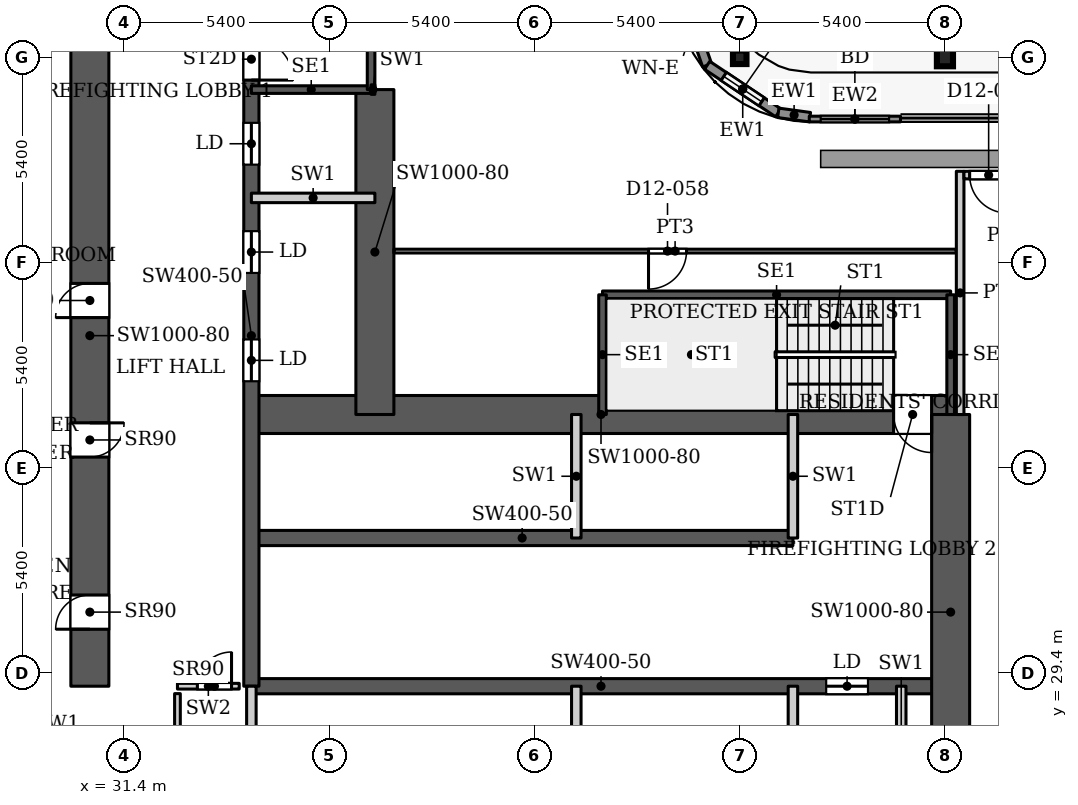
"""IFC4 building model, lengths in metres.
Left out: names, types, materials, properties, quantities, classifications, styles, units other than length and angle.
Written with IfcOpenShell. Run it as: python <this file> out.ifc"""

import sys

from ifc_helpers import new_model, si_unit, direction, frame, frame_2d, origin, origin_2d, place, context, subcontext, project, spatial, rectangle, hollow_rectangle, i_section, extrude, source, transform, mapped, element, fill, save


model = new_model("IFC4")
c1 = context("Model", 3, precision=1e-05, world=origin(), true_north=direction((0.0, 1.0)))
c2 = subcontext(c1, "Body", "Model", "MODEL_VIEW")
j1 = project(units=[si_unit("LENGTHUNIT", "METRE"), si_unit("PLANEANGLEUNIT", "RADIAN")], contexts=[c1])
p1 = place(None, origin())
s1 = spatial("IfcSite", under=j1, at=p1, CompositionType="ELEMENT")
p2 = place(p1, origin())
s2 = spatial("IfcBuilding", under=s1, at=p2, CompositionType="ELEMENT")
p3 = place(p2, frame((0.0, 0.0, 53.9)))
s3 = spatial("IfcBuildingStorey", under=s2, at=p3, CompositionType="ELEMENT", Elevation=53.9)
p4 = place(p3, frame((53.0, 45.6, 0.0), z_axis=(0.0, 0.0, 1.0), x_axis=(1.0, 0.0, 0.0)))
e1 = element("IfcColumn", 1, at=p4, inside=s3, PredefinedType="COLUMN", context=c2, shape_type="SweptSolid", body=[
    extrude(i_section(OverallWidth=0.424, OverallDepth=0.474, WebThickness=0.048, FlangeThickness=0.077, FilletRadius=0.014, at=origin_2d()), origin(), (0.0, 0.0, 1.0), 3.9),
])
p5 = place(p3, frame((47.6, 45.6, 0.0), z_axis=(0.0, 0.0, 1.0), x_axis=(1.0, 0.0, 0.0)))
e2 = element("IfcColumn", 2, at=p5, inside=s3, PredefinedType="COLUMN", context=c2, shape_type="SweptSolid", body=[
    extrude(hollow_rectangle(XDim=0.356, YDim=0.356, WallThickness=0.016, InnerFilletRadius=0.016, OuterFilletRadius=0.032, at=origin_2d()), origin(), (0.0, 0.0, 1.0), 3.9),
])
p6 = place(p3, frame((34.75, 29.05, 0.0), z_axis=(0.0, 0.0, 1.0), x_axis=(1.0, 0.0, 0.0)))
e3 = element("IfcWall", 3, at=p6, inside=s3, PredefinedType="SHEAR", context=c2, shape_type="SweptSolid", body=[
    extrude(rectangle(XDim=18.4, YDim=0.4, at=frame_2d((9.2, 0.0))), origin(), (0.0, 0.0, 1.0), 3.9),
])
p7 = place(p6, frame((15.125, 0.0, 0.0)))
e4 = element("IfcOpeningElement", 4, at=p7, cuts=e3, PredefinedType="OPENING", context=c2, shape_type="SweptSolid", body=[
    extrude(rectangle(XDim=1.1, YDim=2.2, at=frame_2d((0.55, 1.1))), frame((0.0, 0.21, 0.0), z_axis=(0.0, -1.0, 0.0), x_axis=(1.0, 0.0, 0.0)), (0.0, 0.0, 1.0), 0.42),
])
p8 = place(p3, frame((34.75, 32.95, 0.0), z_axis=(0.0, 0.0, 1.0), x_axis=(1.0, 0.0, 0.0)))
e5 = element("IfcWall", 5, at=p8, inside=s3, PredefinedType="SHEAR", context=c2, shape_type="SweptSolid", body=[
    extrude(rectangle(XDim=14.25, YDim=0.4, at=frame_2d((7.125, 0.0))), origin(), (0.0, 0.0, 1.0), 3.9),
])
p9 = place(p3, frame((34.75, 36.2, 0.0), z_axis=(0.0, 0.0, 1.0), x_axis=(1.0, 0.0, 0.0)))
e6 = element("IfcWall", 6, at=p9, inside=s3, PredefinedType="SHEAR", context=c2, shape_type="SweptSolid", body=[
    extrude(rectangle(XDim=18.4, YDim=1.0, at=frame_2d((9.2, 0.0))), origin(), (0.0, 0.0, 1.0), 3.9),
])
p10 = place(p9, frame((16.9, 0.0, 0.0)))
e7 = element("IfcOpeningElement", 7, at=p10, cuts=e6, PredefinedType="OPENING", context=c2, shape_type="SweptSolid", body=[
    extrude(rectangle(XDim=1.0, YDim=2.2, at=frame_2d((0.5, 1.1))), frame((0.0, 0.51, 0.0), z_axis=(0.0, -1.0, 0.0), x_axis=(1.0, 0.0, 0.0)), (0.0, 0.0, 1.0), 1.02),
])
p11 = place(p3, frame((34.75, 29.05, 0.0), z_axis=(0.0, 0.0, 1.0), x_axis=(0.0, 1.0, 0.0)))
e8 = element("IfcWall", 8, at=p11, inside=s3, PredefinedType="SHEAR", context=c2, shape_type="SweptSolid", body=[
    extrude(rectangle(XDim=18.45, YDim=0.4, at=frame_2d((9.225, 0.0))), origin(), (0.0, 0.0, 1.0), 3.9),
])
p12 = place(p11, frame((8.025, 0.0, 0.0)))
e9 = element("IfcOpeningElement", 9, at=p12, cuts=e8, PredefinedType="OPENING", context=c2, shape_type="SweptSolid", body=[
    extrude(rectangle(XDim=1.1, YDim=2.2, at=frame_2d((0.55, 1.1))), frame((0.0, 0.21, 0.0), z_axis=(0.0, -1.0, 0.0), x_axis=(1.0, 0.0, 0.0)), (0.0, 0.0, 1.0), 0.42),
])
p13 = place(p11, frame((10.875, 0.0, 0.0)))
e10 = element("IfcOpeningElement", 10, at=p13, cuts=e8, PredefinedType="OPENING", context=c2, shape_type="SweptSolid", body=[
    extrude(rectangle(XDim=1.1, YDim=2.2, at=frame_2d((0.55, 1.1))), frame((0.0, 0.21, 0.0), z_axis=(0.0, -1.0, 0.0), x_axis=(1.0, 0.0, 0.0)), (0.0, 0.0, 1.0), 0.42),
])
p14 = place(p11, frame((13.725, 0.0, 0.0)))
e11 = element("IfcOpeningElement", 11, at=p14, cuts=e8, PredefinedType="OPENING", context=c2, shape_type="SweptSolid", body=[
    extrude(rectangle(XDim=1.1, YDim=2.2, at=frame_2d((0.55, 1.1))), frame((0.0, 0.21, 0.0), z_axis=(0.0, -1.0, 0.0), x_axis=(1.0, 0.0, 0.0)), (0.0, 0.0, 1.0), 0.42),
])
p15 = place(p11, frame((15.95, 0.0, 0.0)))
e12 = element("IfcOpeningElement", 12, at=p15, cuts=e8, PredefinedType="OPENING", context=c2, shape_type="SweptSolid", body=[
    extrude(rectangle(XDim=1.1, YDim=2.2, at=frame_2d((0.55, 1.1))), frame((0.0, 0.21, 0.0), z_axis=(0.0, -1.0, 0.0), x_axis=(1.0, 0.0, 0.0)), (0.0, 0.0, 1.0), 0.42),
])
p16 = place(p3, frame((38.0, 36.2, 0.0), z_axis=(0.0, 0.0, 1.0), x_axis=(0.0, 1.0, 0.0)))
e13 = element("IfcWall", 13, at=p16, inside=s3, PredefinedType="SHEAR", context=c2, shape_type="SweptSolid", body=[
    extrude(rectangle(XDim=8.55, YDim=1.0, at=frame_2d((4.275, 0.0))), origin(), (0.0, 0.0, 1.0), 3.9),
])
p17 = place(p3, frame((30.5, 29.05, 0.0), z_axis=(0.0, 0.0, 1.0), x_axis=(0.0, 1.0, 0.0)))
e14 = element("IfcWall", 14, at=p17, inside=s3, PredefinedType="SHEAR", context=c2, shape_type="SweptSolid", body=[
    extrude(rectangle(XDim=18.45, YDim=1.0, at=frame_2d((9.225, 0.0))), origin(), (0.0, 0.0, 1.0), 3.9),
])
p18 = place(p17, frame((1.5, 0.0, 0.0)))
e15 = element("IfcOpeningElement", 15, at=p18, cuts=e14, PredefinedType="OPENING", context=c2, shape_type="SweptSolid", body=[
    extrude(rectangle(XDim=0.9, YDim=2.2, at=frame_2d((0.45, 1.1))), frame((0.0, 0.51, 0.0), z_axis=(0.0, -1.0, 0.0), x_axis=(1.0, 0.0, 0.0)), (0.0, 0.0, 1.0), 1.02),
])
p19 = place(p17, frame((6.03, 0.0, 0.0)))
e16 = element("IfcOpeningElement", 16, at=p19, cuts=e14, PredefinedType="OPENING", context=c2, shape_type="SweptSolid", body=[
    extrude(rectangle(XDim=0.9, YDim=2.2, at=frame_2d((0.45, 1.1))), frame((0.0, 0.51, 0.0), z_axis=(0.0, -1.0, 0.0), x_axis=(1.0, 0.0, 0.0)), (0.0, 0.0, 1.0), 1.02),
])
p20 = place(p17, frame((9.7, 0.0, 0.0)))
e17 = element("IfcOpeningElement", 17, at=p20, cuts=e14, PredefinedType="OPENING", context=c2, shape_type="SweptSolid", body=[
    extrude(rectangle(XDim=0.9, YDim=2.2, at=frame_2d((0.45, 1.1))), frame((0.0, 0.51, 0.0), z_axis=(0.0, -1.0, 0.0), x_axis=(1.0, 0.0, 0.0)), (0.0, 0.0, 1.0), 1.02),
])
p21 = place(p3, frame((53.15, 25.8, 0.0), z_axis=(0.0, 0.0, 1.0), x_axis=(0.0, 1.0, 0.0)))
e18 = element("IfcWall", 18, at=p21, inside=s3, PredefinedType="SHEAR", context=c2, shape_type="SweptSolid", body=[
    extrude(rectangle(XDim=10.4, YDim=1.0, at=frame_2d((5.2, 0.0))), origin(), (0.0, 0.0, 1.0), 3.9),
])
p22 = place(p3, frame((29.712, 26.072, 0.0), z_axis=(0.0, 0.0, 1.0), x_axis=(-0.511028049012, 0.859564036662, 0.0)))
e19 = element("IfcWall", 19, at=p22, inside=s3, PredefinedType="SOLIDWALL", context=c2, shape_type="SweptSolid", body=[
    extrude(rectangle(XDim=4.634, YDim=0.25, at=frame_2d((2.317, 0.0))), origin(), (0.0, 0.0, 1.0), 3.133),
])
p23 = place(p3, frame((27.195, 31.969, 0.0), z_axis=(0.0, 0.0, 1.0), x_axis=(0.052554995867, 0.998618031286, 0.0)))
e20 = element("IfcWall", 20, at=p23, inside=s3, PredefinedType="SOLIDWALL", context=c2, shape_type="SweptSolid", body=[
    extrude(rectangle(XDim=66.787, YDim=0.25, at=frame_2d((33.394, 0.0))), origin(), (0.0, 0.0, 1.0), 3.75),
])
p24 = place(p3, frame((46.018, 47.471, 0.0), z_axis=(0.0, 0.0, 1.0), x_axis=(0.328791208903, -0.944402637093, 0.0)))
e21 = element("IfcWall", 21, at=p24, inside=s3, PredefinedType="SOLIDWALL", context=c2, shape_type="SweptSolid", body=[
    extrude(rectangle(XDim=2.205, YDim=0.25, at=frame_2d((1.102, 0.0))), origin(), (0.0, 0.0, 1.0), 3.75),
])
p25 = place(p24, frame((0.503, 0.0, 0.6)))
e22 = element("IfcOpeningElement", 22, at=p25, cuts=e21, PredefinedType="OPENING", context=c2, shape_type="SweptSolid", body=[
    extrude(rectangle(XDim=1.2, YDim=2.1, at=frame_2d((0.6, 1.05))), frame((0.0, 0.135, 0.0), z_axis=(0.0, -1.0, 0.0), x_axis=(1.0, 0.0, 0.0)), (0.0, 0.0, 1.0), 0.27),
])
p26 = place(p3, frame((46.743, 45.389, 0.0), z_axis=(0.0, 0.0, 1.0), x_axis=(0.831449265529, -0.555600682912, 0.0)))
e23 = element("IfcWall", 23, at=p26, inside=s3, PredefinedType="SOLIDWALL", context=c2, shape_type="SweptSolid", body=[
    extrude(rectangle(XDim=2.251, YDim=0.25, at=frame_2d((1.126, 0.0))), origin(), (0.0, 0.0, 1.0), 3.75),
])
p27 = place(p26, frame((0.525, 0.0, 0.6)))
e24 = element("IfcOpeningElement", 24, at=p27, cuts=e23, PredefinedType="OPENING", context=c2, shape_type="SweptSolid", body=[
    extrude(rectangle(XDim=1.2, YDim=2.1, at=frame_2d((0.6, 1.05))), frame((0.0, 0.135, 0.0), z_axis=(0.0, -1.0, 0.0), x_axis=(1.0, 0.0, 0.0)), (0.0, 0.0, 1.0), 0.27),
])
p28 = place(p3, frame((48.615, 44.138, 0.0), z_axis=(0.0, 0.0, 1.0), x_axis=(0.990741504246, -0.135761819977, 0.0)))
e25 = element("IfcWall", 25, at=p28, inside=s3, PredefinedType="SOLIDWALL", context=c2, shape_type="SweptSolid", body=[
    extrude(rectangle(XDim=0.84, YDim=0.25, at=frame_2d((0.42, 0.0))), origin(), (0.0, 0.0, 1.0), 3.75),
])
p29 = place(p3, frame((49.43, 43.975, 0.0), z_axis=(0.0, 0.0, 1.0), x_axis=(1.0, 0.0, 0.0)))
e26 = element("IfcWall", 26, at=p29, inside=s3, PredefinedType="SOLIDWALL", context=c2, shape_type="SweptSolid", body=[
    extrude(rectangle(XDim=2.4, YDim=0.15, at=frame_2d((1.2, 0.0))), origin(), (0.0, 0.0, 1.0), 3.75),
])
p30 = place(p29, frame((0.3, 0.0, 0.0)))
e27 = element("IfcOpeningElement", 27, at=p30, cuts=e26, PredefinedType="OPENING", context=c2, shape_type="SweptSolid", body=[
    extrude(rectangle(XDim=1.8, YDim=2.4, at=frame_2d((0.9, 1.2))), frame((0.0, 0.085, 0.0), z_axis=(0.0, -1.0, 0.0), x_axis=(1.0, 0.0, 0.0)), (0.0, 0.0, 1.0), 0.17),
])
p31 = place(p3, frame((43.99, 39.35, 0.0), z_axis=(0.0, 0.0, 1.0), x_axis=(1.0, 0.0, 0.0)))
e28 = element("IfcWall", 28, at=p31, inside=s3, PredefinedType="SHEAR", context=c2, shape_type="SweptSolid", body=[
    extrude(rectangle(XDim=9.16, YDim=0.2, at=frame_2d((4.58, 0.0))), origin(), (0.0, 0.0, 1.0), 3.9),
])
for number, where, z_axis, x_axis in (
    (29, (43.99, 36.2, 0.0), (0.0, 0.0, 1.0), (0.0, 1.0, 0.0)),
    (30, (53.15, 36.2, 0.0), (0.0, 0.0, 1.0), (0.0, 1.0, 0.0)),
):
    element("IfcWall", number, at=place(p3, frame(where, z_axis=z_axis, x_axis=x_axis)), inside=s3, PredefinedType="SHEAR", context=c2, shape_type="SweptSolid", body=[
        extrude(rectangle(XDim=3.15, YDim=0.2, at=frame_2d((1.575, 0.0))), origin(), (0.0, 0.0, 1.0), 3.9),
    ])
p32 = place(p3, frame((34.75, 44.75, 0.0), z_axis=(0.0, 0.0, 1.0), x_axis=(1.0, 0.0, 0.0)))
e31 = element("IfcWall", 31, at=p32, inside=s3, PredefinedType="SHEAR", context=c2, shape_type="SweptSolid", body=[
    extrude(rectangle(XDim=3.15, YDim=0.2, at=frame_2d((1.575, 0.0))), origin(), (0.0, 0.0, 1.0), 3.9),
])
p33 = place(p3, frame((37.9, 44.75, 0.0), z_axis=(0.0, 0.0, 1.0), x_axis=(0.0, 1.0, 0.0)))
e32 = element("IfcWall", 32, at=p33, inside=s3, PredefinedType="SHEAR", context=c2, shape_type="SweptSolid", body=[
    extrude(rectangle(XDim=9.16, YDim=0.2, at=frame_2d((4.58, 0.0))), origin(), (0.0, 0.0, 1.0), 3.9),
])
for number, where, z_axis, x_axis in (
    (33, (34.75, 25.8, 0.0), (0.0, 0.0, 1.0), (0.0, 1.0, 0.0)),
    (34, (43.3, 25.8, 0.0), (0.0, 0.0, 1.0), (0.0, 1.0, 0.0)),
    (35, (43.3, 32.95, 0.0), (0.0, 0.0, 1.0), (0.0, 1.0, 0.0)),
    (36, (49.0, 25.8, 0.0), (0.0, 0.0, 1.0), (0.0, 1.0, 0.0)),
    (37, (49.0, 32.95, 0.0), (0.0, 0.0, 1.0), (0.0, 1.0, 0.0)),
    (38, (51.85, 25.8, 0.0), (0.0, 0.0, 1.0), (0.0, 1.0, 0.0)),
    (39, (34.75, 41.9, 0.0), (0.0, 0.0, 1.0), (1.0, 0.0, 0.0)),
):
    element("IfcWall", number, at=place(p3, frame(where, z_axis=z_axis, x_axis=x_axis)), inside=s3, PredefinedType="PARTITIONING", context=c2, shape_type="SweptSolid", body=[
        extrude(rectangle(XDim=3.25, YDim=0.25, at=frame_2d((1.625, 0.0))), origin(), (0.0, 0.0, 1.0), 3.9),
    ])
p34 = place(p3, frame((37.9, 44.75, 0.0), z_axis=(0.0, 0.0, 1.0), x_axis=(1.0, 0.0, 0.0)))
e40 = element("IfcWall", 40, at=p34, inside=s3, PredefinedType="PARTITIONING", context=c2, shape_type="SweptSolid", body=[
    extrude(rectangle(XDim=0.1, YDim=0.25, at=frame_2d((0.05, 0.0))), origin(), (0.0, 0.0, 1.0), 3.9),
])
p35 = place(p3, frame((32.805, 29.05, 0.0), z_axis=(0.0, 0.0, 1.0), x_axis=(1.0, 0.0, 0.0)))
e41 = element("IfcWall", 41, at=p35, inside=s3, PredefinedType="PARTITIONING", context=c2, shape_type="SweptSolid", body=[
    extrude(rectangle(XDim=1.625, YDim=0.15, at=frame_2d((0.812, 0.0))), origin(), (0.0, 0.0, 1.0), 3.9),
])
p36 = place(p35, frame((0.523, 0.0, 0.0)))
e42 = element("IfcOpeningElement", 42, at=p36, cuts=e41, PredefinedType="OPENING", context=c2, shape_type="SweptSolid", body=[
    extrude(rectangle(XDim=0.9, YDim=2.2, at=frame_2d((0.45, 1.1))), frame((0.0, 0.085, 0.0), z_axis=(0.0, -1.0, 0.0), x_axis=(1.0, 0.0, 0.0)), (0.0, 0.0, 1.0), 0.17),
])
p37 = place(p3, frame((32.805, 24.98, 0.0), z_axis=(0.0, 0.0, 1.0), x_axis=(0.0, 1.0, 0.0)))
e43 = element("IfcWall", 43, at=p37, inside=s3, PredefinedType="PARTITIONING", context=c2, shape_type="SweptSolid", body=[
    extrude(rectangle(XDim=3.875, YDim=0.15, at=frame_2d((1.938, 0.0))), origin(), (0.0, 0.0, 1.0), 3.9),
])
p38 = place(p3, frame((38.499, 40.5, 0.0), z_axis=(0.0, 0.0, 1.0), x_axis=(1.0, 0.0, 0.0)))
e44 = element("IfcWall", 44, at=p38, inside=s3, PredefinedType="PARTITIONING", context=c2, shape_type="SweptSolid", body=[
    extrude(rectangle(XDim=14.801, YDim=0.1, at=frame_2d((7.4, 0.0))), origin(), (0.0, 0.0, 1.0), 3.6),
])
p39 = place(p38, frame((6.701, 0.0, 0.0)))
e45 = element("IfcOpeningElement", 45, at=p39, cuts=e44, PredefinedType="OPENING", context=c2, shape_type="SweptSolid", body=[
    extrude(rectangle(XDim=1.0, YDim=2.1, at=frame_2d((0.5, 1.05))), frame((0.0, 0.06, 0.0), z_axis=(0.0, -1.0, 0.0), x_axis=(1.0, 0.0, 0.0)), (0.0, 0.0, 1.0), 0.12),
])
p40 = place(p3, frame((53.4, 36.199, 0.0), z_axis=(0.0, 0.0, 1.0), x_axis=(0.0, 1.0, 0.0)))
e46 = element("IfcWall", 46, at=p40, inside=s3, PredefinedType="PARTITIONING", context=c2, shape_type="SweptSolid", body=[
    extrude(rectangle(XDim=6.401, YDim=0.2, at=frame_2d((3.201, 0.0))), origin(), (0.0, 0.0, 1.0), 3.6),
])
p41 = place(p3, frame((53.5, 42.5, 0.0), z_axis=(0.0, 0.0, 1.0), x_axis=(1.0, 0.0, 0.0)))
e47 = element("IfcWall", 47, at=p41, inside=s3, PredefinedType="PARTITIONING", context=c2, shape_type="SweptSolid", body=[
    extrude(rectangle(XDim=2.2, YDim=0.2, at=frame_2d((1.1, 0.0))), origin(), (0.0, 0.0, 1.0), 3.6),
])
p42 = place(p41, frame((0.15, 0.0, 0.0)))
e48 = element("IfcOpeningElement", 48, at=p42, cuts=e47, PredefinedType="OPENING", context=c2, shape_type="SweptSolid", body=[
    extrude(rectangle(XDim=1.0, YDim=2.1, at=frame_2d((0.5, 1.05))), frame((0.0, 0.11, 0.0), z_axis=(0.0, -1.0, 0.0), x_axis=(1.0, 0.0, 0.0)), (0.0, 0.0, 1.0), 0.22),
])
m1 = source(origin(), c2, "Body", "SweptSolid", [
    extrude(rectangle(XDim=1.2, YDim=2.1, at=frame_2d((0.6, 1.05))), frame((0.0, 0.03, 0.0), z_axis=(0.0, -1.0, 0.0), x_axis=(1.0, 0.0, 0.0)), (0.0, 0.0, 1.0), 0.06),
])
p43 = place(p27, origin())
e49 = element("IfcWindow", 49, at=p43, inside=s3, PartitioningType="SINGLE_PANEL", PredefinedType="WINDOW", context=c2, shape_type="MappedRepresentation", body=[
    mapped(m1, transform((0.0, 0.0, 0.0), x_axis=(1.0, 0.0, 0.0), y_axis=(0.0, 1.0, 0.0), z_axis=(0.0, 0.0, 1.0), scale=1.0)),
])
fill(e24, e49)
m2 = source(origin(), c2, "Body", "SweptSolid", [
    extrude(rectangle(XDim=1.8, YDim=2.4, at=frame_2d((0.9, 1.2))), frame((0.0, 0.025, 0.0), z_axis=(0.0, -1.0, 0.0), x_axis=(1.0, 0.0, 0.0)), (0.0, 0.0, 1.0), 0.05),
])
p44 = place(p30, origin())
e50 = element("IfcDoor", 50, at=p44, inside=s3, OperationType="SLIDING_TO_LEFT", PredefinedType="DOOR", context=c2, shape_type="MappedRepresentation", body=[
    mapped(m2, transform((0.0, 0.0, 0.0), x_axis=(1.0, 0.0, 0.0), y_axis=(0.0, 1.0, 0.0), z_axis=(0.0, 0.0, 1.0), scale=1.0)),
])
fill(e27, e50)
m3 = source(origin(), c2, "Body", "SweptSolid", [
    extrude(rectangle(XDim=1.1, YDim=2.2, at=frame_2d((0.55, 1.1))), frame((0.0, 0.025, 0.0), z_axis=(0.0, -1.0, 0.0), x_axis=(1.0, 0.0, 0.0)), (0.0, 0.0, 1.0), 0.05),
])
p45 = place(p12, origin())
e51 = element("IfcDoor", 51, at=p45, inside=s3, OperationType="SLIDING_TO_LEFT", PredefinedType="DOOR", context=c2, shape_type="MappedRepresentation", body=[
    mapped(m3, transform((0.0, 0.0, 0.0), x_axis=(1.0, 0.0, 0.0), y_axis=(0.0, 1.0, 0.0), z_axis=(0.0, 0.0, 1.0), scale=1.0)),
])
fill(e9, e51)
p46 = place(p13, origin())
e52 = element("IfcDoor", 52, at=p46, inside=s3, OperationType="SLIDING_TO_LEFT", PredefinedType="DOOR", context=c2, shape_type="MappedRepresentation", body=[
    mapped(m3, transform((0.0, 0.0, 0.0), x_axis=(1.0, 0.0, 0.0), y_axis=(0.0, 1.0, 0.0), z_axis=(0.0, 0.0, 1.0), scale=1.0)),
])
fill(e10, e52)
p47 = place(p14, origin())
e53 = element("IfcDoor", 53, at=p47, inside=s3, OperationType="SLIDING_TO_LEFT", PredefinedType="DOOR", context=c2, shape_type="MappedRepresentation", body=[
    mapped(m3, transform((0.0, 0.0, 0.0), x_axis=(1.0, 0.0, 0.0), y_axis=(0.0, 1.0, 0.0), z_axis=(0.0, 0.0, 1.0), scale=1.0)),
])
fill(e11, e53)
p48 = place(p7, origin())
e54 = element("IfcDoor", 54, at=p48, inside=s3, OperationType="SLIDING_TO_LEFT", PredefinedType="DOOR", context=c2, shape_type="MappedRepresentation", body=[
    mapped(m3, transform((0.0, 0.0, 0.0), x_axis=(1.0, 0.0, 0.0), y_axis=(0.0, 1.0, 0.0), z_axis=(0.0, 0.0, 1.0), scale=1.0)),
])
fill(e4, e54)
m4 = source(origin(), c2, "Body", "SweptSolid", [
    extrude(rectangle(XDim=0.9, YDim=2.2, at=frame_2d((0.45, 1.1))), frame((0.0, 0.025, 0.0), z_axis=(0.0, -1.0, 0.0), x_axis=(1.0, 0.0, 0.0)), (0.0, 0.0, 1.0), 0.05),
])
p49 = place(p18, origin())
e55 = element("IfcDoor", 55, at=p49, inside=s3, OperationType="SINGLE_SWING_LEFT", PredefinedType="DOOR", context=c2, shape_type="MappedRepresentation", body=[
    mapped(m4, transform((0.0, 0.0, 0.0), x_axis=(1.0, 0.0, 0.0), y_axis=(0.0, 1.0, 0.0), z_axis=(0.0, 0.0, 1.0), scale=1.0)),
])
fill(e15, e55)
p50 = place(p19, origin())
e56 = element("IfcDoor", 56, at=p50, inside=s3, OperationType="SINGLE_SWING_RIGHT", PredefinedType="DOOR", context=c2, shape_type="MappedRepresentation", body=[
    mapped(m4, transform((0.0, 0.0, 0.0), x_axis=(1.0, 0.0, 0.0), y_axis=(0.0, 1.0, 0.0), z_axis=(0.0, 0.0, 1.0), scale=1.0)),
])
fill(e16, e56)
p51 = place(p20, origin())
e57 = element("IfcDoor", 57, at=p51, inside=s3, OperationType="SINGLE_SWING_LEFT", PredefinedType="DOOR", context=c2, shape_type="MappedRepresentation", body=[
    mapped(m4, transform((0.0, 0.0, 0.0), x_axis=(1.0, 0.0, 0.0), y_axis=(0.0, 1.0, 0.0), z_axis=(0.0, 0.0, 1.0), scale=1.0)),
])
fill(e17, e57)
p52 = place(p36, origin())
e58 = element("IfcDoor", 58, at=p52, inside=s3, OperationType="SINGLE_SWING_LEFT", PredefinedType="DOOR", context=c2, shape_type="MappedRepresentation", body=[
    mapped(m4, transform((0.0, 0.0, 0.0), x_axis=(1.0, 0.0, 0.0), y_axis=(0.0, 1.0, 0.0), z_axis=(0.0, 0.0, 1.0), scale=1.0)),
])
fill(e42, e58)
m5 = source(origin(), c2, "Body", "SweptSolid", [
    extrude(rectangle(XDim=1.0, YDim=2.2, at=frame_2d((0.5, 1.1))), frame((0.0, 0.025, 0.0), z_axis=(0.0, -1.0, 0.0), x_axis=(1.0, 0.0, 0.0)), (0.0, 0.0, 1.0), 0.05),
])
p53 = place(p10, origin())
e59 = element("IfcDoor", 59, at=p53, inside=s3, OperationType="SINGLE_SWING_RIGHT", PredefinedType="DOOR", context=c2, shape_type="MappedRepresentation", body=[
    mapped(m5, transform((0.0, 0.0, 0.0), x_axis=(1.0, 0.0, 0.0), y_axis=(0.0, 1.0, 0.0), z_axis=(0.0, 0.0, 1.0), scale=1.0)),
])
fill(e7, e59)
m6 = source(origin(), c2, "Body", "SweptSolid", [
    extrude(rectangle(XDim=1.1, YDim=2.2, at=frame_2d((0.55, 1.1))), frame((0.0, 0.025, 0.0), z_axis=(0.0, -1.0, 0.0), x_axis=(1.0, 0.0, 0.0)), (0.0, 0.0, 1.0), 0.05),
])
p54 = place(p15, origin())
e60 = element("IfcDoor", 60, at=p54, inside=s3, OperationType="SINGLE_SWING_RIGHT", PredefinedType="DOOR", context=c2, shape_type="MappedRepresentation", body=[
    mapped(m6, transform((0.0, 0.0, 0.0), x_axis=(1.0, 0.0, 0.0), y_axis=(0.0, 1.0, 0.0), z_axis=(0.0, 0.0, 1.0), scale=1.0)),
])
fill(e12, e60)
m7 = source(origin(), c2, "Body", "SweptSolid", [
    extrude(rectangle(XDim=1.0, YDim=2.1, at=frame_2d((0.5, 1.05))), frame((0.0, 0.025, 0.0), z_axis=(0.0, -1.0, 0.0), x_axis=(1.0, 0.0, 0.0)), (0.0, 0.0, 1.0), 0.05),
])
p55 = place(p39, origin())
e61 = element("IfcDoor", 61, at=p55, inside=s3, OperationType="SINGLE_SWING_RIGHT", PredefinedType="DOOR", context=c2, shape_type="MappedRepresentation", body=[
    mapped(m7, transform((0.0, 0.0, 0.0), x_axis=(1.0, 0.0, 0.0), y_axis=(0.0, 1.0, 0.0), z_axis=(0.0, 0.0, 1.0), scale=1.0)),
])
fill(e45, e61)
m8 = source(origin(), c2, "Body", "SweptSolid", [
    extrude(rectangle(XDim=1.0, YDim=2.1, at=frame_2d((0.5, 1.05))), frame((0.0, 0.025, 0.0), z_axis=(0.0, -1.0, 0.0), x_axis=(1.0, 0.0, 0.0)), (0.0, 0.0, 1.0), 0.05),
])
p56 = place(p42, origin())
e62 = element("IfcDoor", 62, at=p56, inside=s3, OperationType="SINGLE_SWING_RIGHT", PredefinedType="DOOR", context=c2, shape_type="MappedRepresentation", body=[
    mapped(m8, transform((0.0, 0.0, 0.0), x_axis=(1.0, 0.0, 0.0), y_axis=(0.0, 1.0, 0.0), z_axis=(0.0, 0.0, 1.0), scale=1.0)),
])
fill(e48, e62)
save(model, sys.argv[1])
